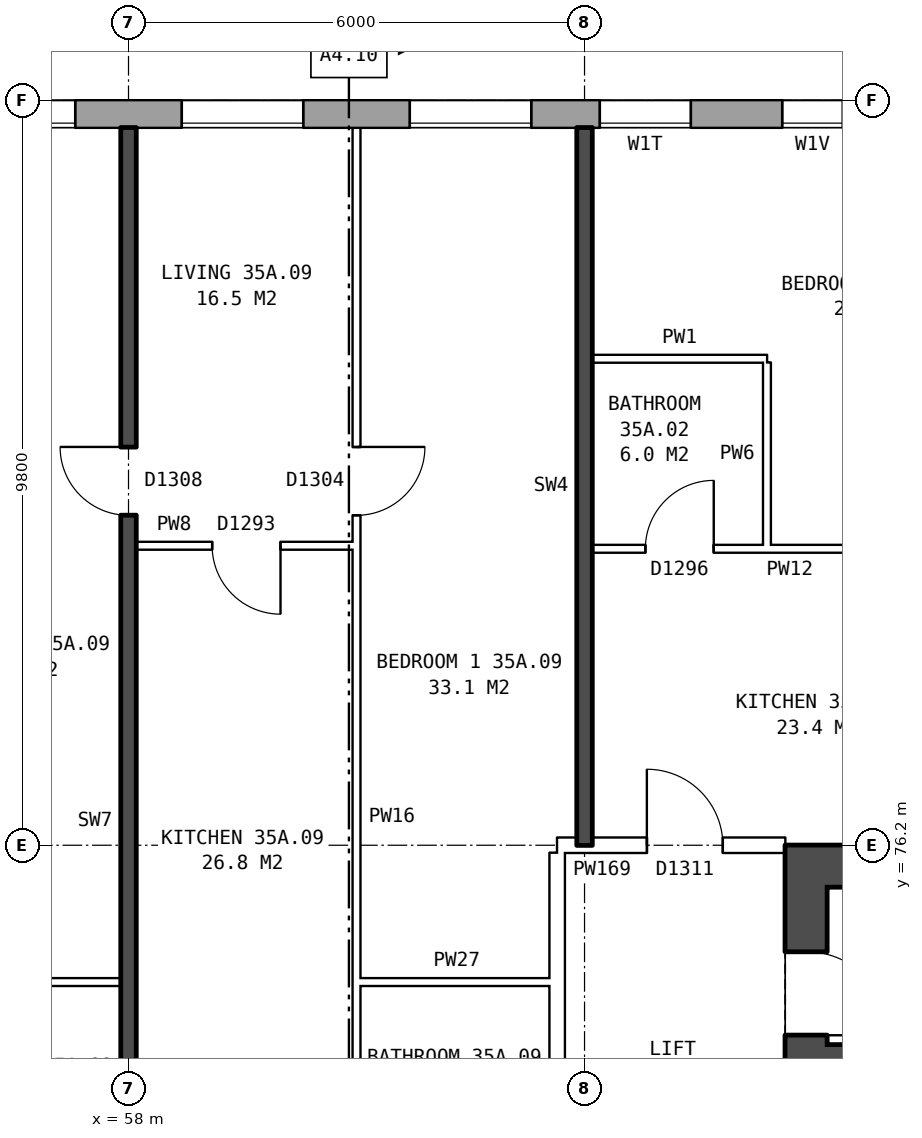
"""IFC4 building model, lengths in metres.
Left out: names, types, materials, properties, quantities, classifications, styles, units other than length and angle.
Written with IfcOpenShell. Run it as: python <this file> out.ifc"""

import sys

from ifc_helpers import new_model, si_unit, direction, frame, frame_2d, origin, place, context, subcontext, project, spatial, rectangle, extrude, element, fill, save


model = new_model("IFC4")
c1 = context("Model", 3, precision=1e-05, world=origin(), true_north=direction((0.0, 1.0)))
c2 = subcontext(c1, "Body", "Model", "MODEL_VIEW")
j1 = project(units=[si_unit("LENGTHUNIT", "METRE"), si_unit("PLANEANGLEUNIT", "RADIAN")], contexts=[c1])
p1 = place(None, origin())
s1 = spatial("IfcSite", under=j1, at=p1, CompositionType="ELEMENT")
p2 = place(p1, origin())
s2 = spatial("IfcBuilding", under=s1, at=p2, CompositionType="ELEMENT")
p3 = place(p2, frame((0.0, 0.0, 126.8)))
s3 = spatial("IfcBuildingStorey", under=s2, at=p3, CompositionType="ELEMENT", Elevation=126.8)
p4 = place(p3, frame((72.925, 85.82, 0.0), z_axis=(0.0, 0.0, 1.0), x_axis=(-1.0, 0.0, 0.0)))
e1 = element("IfcWall", 1, at=p4, inside=s3, PredefinedType="STANDARD", context=c2, shape_type="SweptSolid", body=[
    extrude(rectangle(XDim=43.101, YDim=0.36, at=frame_2d((21.55, 0.0))), origin(), (0.0, 0.0, 1.0), 2.85),
])
p5 = place(p4, frame((0.625, 0.0, 0.8)))
e2 = element("IfcOpeningElement", 2, at=p5, cuts=e1, PredefinedType="OPENING", context=c2, shape_type="SweptSolid", body=[
    extrude(rectangle(XDim=1.6, YDim=1.8, at=frame_2d((0.8, 0.9))), frame((0.0, 0.19, 0.0), z_axis=(0.0, -1.0, 0.0), x_axis=(1.0, 0.0, 0.0)), (0.0, 0.0, 1.0), 0.38),
])
p6 = place(p4, frame((3.625, 0.0, 0.8)))
e3 = element("IfcOpeningElement", 3, at=p6, cuts=e1, PredefinedType="OPENING", context=c2, shape_type="SweptSolid", body=[
    extrude(rectangle(XDim=1.6, YDim=1.8, at=frame_2d((0.8, 0.9))), frame((0.0, 0.19, 0.0), z_axis=(0.0, -1.0, 0.0), x_axis=(1.0, 0.0, 0.0)), (0.0, 0.0, 1.0), 0.38),
])
p7 = place(p4, frame((5.525, 0.0, 1.7)))
e4 = element("IfcOpeningElement", 4, at=p7, cuts=e1, PredefinedType="OPENING", context=c2, shape_type="SweptSolid", body=[
    extrude(rectangle(XDim=0.8, YDim=0.9, at=frame_2d((0.4, 0.45))), frame((0.0, 0.19, 0.0), z_axis=(0.0, -1.0, 0.0), x_axis=(1.0, 0.0, 0.0)), (0.0, 0.0, 1.0), 0.38),
])
p8 = place(p4, frame((9.625, 0.0, 0.8)))
e5 = element("IfcOpeningElement", 5, at=p8, cuts=e1, PredefinedType="OPENING", context=c2, shape_type="SweptSolid", body=[
    extrude(rectangle(XDim=1.6, YDim=1.8, at=frame_2d((0.8, 0.9))), frame((0.0, 0.19, 0.0), z_axis=(0.0, -1.0, 0.0), x_axis=(1.0, 0.0, 0.0)), (0.0, 0.0, 1.0), 0.38),
])
p9 = place(p4, frame((12.625, 0.0, 0.8)))
e6 = element("IfcOpeningElement", 6, at=p9, cuts=e1, PredefinedType="OPENING", context=c2, shape_type="SweptSolid", body=[
    extrude(rectangle(XDim=1.6, YDim=1.8, at=frame_2d((0.8, 0.9))), frame((0.0, 0.19, 0.0), z_axis=(0.0, -1.0, 0.0), x_axis=(1.0, 0.0, 0.0)), (0.0, 0.0, 1.0), 0.38),
])
p10 = place(p4, frame((15.625, 0.0, 0.8)))
e7 = element("IfcOpeningElement", 7, at=p10, cuts=e1, PredefinedType="OPENING", context=c2, shape_type="SweptSolid", body=[
    extrude(rectangle(XDim=1.6, YDim=1.8, at=frame_2d((0.8, 0.9))), frame((0.0, 0.19, 0.0), z_axis=(0.0, -1.0, 0.0), x_axis=(1.0, 0.0, 0.0)), (0.0, 0.0, 1.0), 0.38),
])
p11 = place(p4, frame((18.625, 0.0, 0.8)))
e8 = element("IfcOpeningElement", 8, at=p11, cuts=e1, PredefinedType="OPENING", context=c2, shape_type="SweptSolid", body=[
    extrude(rectangle(XDim=1.6, YDim=1.8, at=frame_2d((0.8, 0.9))), frame((0.0, 0.19, 0.0), z_axis=(0.0, -1.0, 0.0), x_axis=(1.0, 0.0, 0.0)), (0.0, 0.0, 1.0), 0.38),
])
p12 = place(p4, frame((21.625, 0.0, 0.8)))
e9 = element("IfcOpeningElement", 9, at=p12, cuts=e1, PredefinedType="OPENING", context=c2, shape_type="SweptSolid", body=[
    extrude(rectangle(XDim=1.6, YDim=1.8, at=frame_2d((0.8, 0.9))), frame((0.0, 0.19, 0.0), z_axis=(0.0, -1.0, 0.0), x_axis=(1.0, 0.0, 0.0)), (0.0, 0.0, 1.0), 0.38),
])
p13 = place(p4, frame((24.625, 0.0, 0.8)))
e10 = element("IfcOpeningElement", 10, at=p13, cuts=e1, PredefinedType="OPENING", context=c2, shape_type="SweptSolid", body=[
    extrude(rectangle(XDim=1.6, YDim=1.8, at=frame_2d((0.8, 0.9))), frame((0.0, 0.19, 0.0), z_axis=(0.0, -1.0, 0.0), x_axis=(1.0, 0.0, 0.0)), (0.0, 0.0, 1.0), 0.38),
])
p14 = place(p4, frame((27.625, 0.0, 0.8)))
e11 = element("IfcOpeningElement", 11, at=p14, cuts=e1, PredefinedType="OPENING", context=c2, shape_type="SweptSolid", body=[
    extrude(rectangle(XDim=1.6, YDim=1.8, at=frame_2d((0.8, 0.9))), frame((0.0, 0.19, 0.0), z_axis=(0.0, -1.0, 0.0), x_axis=(1.0, 0.0, 0.0)), (0.0, 0.0, 1.0), 0.38),
])
p15 = place(p4, frame((30.625, 0.0, 0.8)))
e12 = element("IfcOpeningElement", 12, at=p15, cuts=e1, PredefinedType="OPENING", context=c2, shape_type="SweptSolid", body=[
    extrude(rectangle(XDim=1.6, YDim=1.8, at=frame_2d((0.8, 0.9))), frame((0.0, 0.19, 0.0), z_axis=(0.0, -1.0, 0.0), x_axis=(1.0, 0.0, 0.0)), (0.0, 0.0, 1.0), 0.38),
])
p16 = place(p4, frame((33.125, 0.0, 0.8)))
e13 = element("IfcOpeningElement", 13, at=p16, cuts=e1, PredefinedType="OPENING", context=c2, shape_type="SweptSolid", body=[
    extrude(rectangle(XDim=1.4, YDim=1.8, at=frame_2d((0.7, 0.9))), frame((0.0, 0.19, 0.0), z_axis=(0.0, -1.0, 0.0), x_axis=(1.0, 0.0, 0.0)), (0.0, 0.0, 1.0), 0.38),
])
p17 = place(p4, frame((34.825, 0.0, 0.8)))
e14 = element("IfcOpeningElement", 14, at=p17, cuts=e1, PredefinedType="OPENING", context=c2, shape_type="SweptSolid", body=[
    extrude(rectangle(XDim=0.6, YDim=0.9, at=frame_2d((0.3, 0.45))), frame((0.0, 0.19, 0.0), z_axis=(0.0, -1.0, 0.0), x_axis=(1.0, 0.0, 0.0)), (0.0, 0.0, 1.0), 0.38),
])
p18 = place(p4, frame((39.625, 0.0, 0.8)))
e15 = element("IfcOpeningElement", 15, at=p18, cuts=e1, PredefinedType="OPENING", context=c2, shape_type="SweptSolid", body=[
    extrude(rectangle(XDim=1.6, YDim=1.8, at=frame_2d((0.8, 0.9))), frame((0.0, 0.19, 0.0), z_axis=(0.0, -1.0, 0.0), x_axis=(1.0, 0.0, 0.0)), (0.0, 0.0, 1.0), 0.38),
])
p19 = place(p4, frame((7.525, 0.0, 0.8)))
e16 = element("IfcOpeningElement", 16, at=p19, cuts=e1, PredefinedType="OPENING", context=c2, shape_type="SweptSolid", body=[
    extrude(rectangle(XDim=1.2, YDim=0.9, at=frame_2d((0.6, 0.45))), frame((0.0, 0.19, 0.0), z_axis=(0.0, -1.0, 0.0), x_axis=(1.0, 0.0, 0.0)), (0.0, 0.0, 1.0), 0.38),
])
p20 = place(p4, frame((36.725, 0.0, 1.7)))
e17 = element("IfcOpeningElement", 17, at=p20, cuts=e1, PredefinedType="OPENING", context=c2, shape_type="SweptSolid", body=[
    extrude(rectangle(XDim=0.6, YDim=0.9, at=frame_2d((0.3, 0.45))), frame((0.0, 0.19, 0.0), z_axis=(0.0, -1.0, 0.0), x_axis=(1.0, 0.0, 0.0)), (0.0, 0.0, 1.0), 0.38),
])
p21 = place(p4, frame((37.725, 0.0, 0.8)))
e18 = element("IfcOpeningElement", 18, at=p21, cuts=e1, PredefinedType="OPENING", context=c2, shape_type="SweptSolid", body=[
    extrude(rectangle(XDim=1.0, YDim=1.8, at=frame_2d((0.5, 0.9))), frame((0.0, 0.19, 0.0), z_axis=(0.0, -1.0, 0.0), x_axis=(1.0, 0.0, 0.0)), (0.0, 0.0, 1.0), 0.38),
])
p22 = place(p3, frame((66.915, 63.8, 0.0), z_axis=(0.0, 0.0, 1.0), x_axis=(0.0, 1.0, 0.0)))
e19 = element("IfcWall", 19, at=p22, inside=s3, PredefinedType="SHEAR", context=c2, shape_type="SweptSolid", body=[
    extrude(rectangle(XDim=12.4, YDim=0.55, at=frame_2d((6.2, 0.0))), origin(), (0.0, 0.0, 1.0), 2.85),
])
p23 = place(p22, frame((1.325, 0.0, 0.0)))
e20 = element("IfcOpeningElement", 20, at=p23, cuts=e19, PredefinedType="OPENING", context=c2, shape_type="SweptSolid", body=[
    extrude(rectangle(XDim=1.1, YDim=2.1, at=frame_2d((0.55, 1.05))), frame((0.0, 0.285, 0.0), z_axis=(0.0, -1.0, 0.0), x_axis=(1.0, 0.0, 0.0)), (0.0, 0.0, 1.0), 0.57),
])
p24 = place(p22, frame((3.6, 0.0, 0.0)))
e21 = element("IfcOpeningElement", 21, at=p24, cuts=e19, PredefinedType="OPENING", context=c2, shape_type="SweptSolid", body=[
    extrude(rectangle(XDim=1.1, YDim=2.1, at=frame_2d((0.55, 1.05))), frame((0.0, 0.285, 0.0), z_axis=(0.0, -1.0, 0.0), x_axis=(1.0, 0.0, 0.0)), (0.0, 0.0, 1.0), 0.57),
])
p25 = place(p22, frame((5.8, 0.0, 0.0)))
e22 = element("IfcOpeningElement", 22, at=p25, cuts=e19, PredefinedType="OPENING", context=c2, shape_type="SweptSolid", body=[
    extrude(rectangle(XDim=1.1, YDim=2.1, at=frame_2d((0.55, 1.05))), frame((0.0, 0.285, 0.0), z_axis=(0.0, -1.0, 0.0), x_axis=(1.0, 0.0, 0.0)), (0.0, 0.0, 1.0), 0.57),
])
p26 = place(p22, frame((8.0, 0.0, 0.0)))
e23 = element("IfcOpeningElement", 23, at=p26, cuts=e19, PredefinedType="OPENING", context=c2, shape_type="SweptSolid", body=[
    extrude(rectangle(XDim=1.1, YDim=2.1, at=frame_2d((0.55, 1.05))), frame((0.0, 0.285, 0.0), z_axis=(0.0, -1.0, 0.0), x_axis=(1.0, 0.0, 0.0)), (0.0, 0.0, 1.0), 0.57),
])
p27 = place(p22, frame((9.9, 0.0, 0.0)))
e24 = element("IfcOpeningElement", 24, at=p27, cuts=e19, PredefinedType="OPENING", context=c2, shape_type="SweptSolid", body=[
    extrude(rectangle(XDim=1.1, YDim=2.1, at=frame_2d((0.55, 1.05))), frame((0.0, 0.285, 0.0), z_axis=(0.0, -1.0, 0.0), x_axis=(1.0, 0.0, 0.0)), (0.0, 0.0, 1.0), 0.57),
])
p28 = place(p3, frame((67.19, 75.925, 0.0), z_axis=(0.0, 0.0, 1.0), x_axis=(1.0, 0.0, 0.0)))
e25 = element("IfcWall", 25, at=p28, inside=s3, PredefinedType="SHEAR", context=c2, shape_type="SweptSolid", body=[
    extrude(rectangle(XDim=7.9, YDim=0.55, at=frame_2d((3.95, 0.0))), origin(), (0.0, 0.0, 1.0), 2.85),
])
p29 = place(p3, frame((67.19, 73.45, 0.0), z_axis=(0.0, 0.0, 1.0), x_axis=(1.0, 0.0, 0.0)))
e26 = element("IfcWall", 26, at=p29, inside=s3, PredefinedType="SHEAR", context=c2, shape_type="SweptSolid", body=[
    extrude(rectangle(XDim=2.375, YDim=0.25, at=frame_2d((1.188, 0.0))), origin(), (0.0, 0.0, 1.0), 2.85),
])
p30 = place(p3, frame((63.64, 63.9, 0.0), z_axis=(0.0, 0.0, 1.0), x_axis=(0.0, 1.0, 0.0)))
e27 = element("IfcWall", 27, at=p30, inside=s3, PredefinedType="PARTITIONING", context=c2, shape_type="SweptSolid", body=[
    extrude(rectangle(XDim=12.2, YDim=0.2, at=frame_2d((6.1, 0.0))), origin(), (0.0, 0.0, 1.0), 2.85),
])
p31 = place(p30, frame((5.1, 0.0, 0.0)))
e28 = element("IfcOpeningElement", 28, at=p31, cuts=e27, PredefinedType="OPENING", context=c2, shape_type="SweptSolid", body=[
    extrude(rectangle(XDim=2.0, YDim=2.1, at=frame_2d((1.0, 1.05))), frame((0.0, 0.11, 0.0), z_axis=(0.0, -1.0, 0.0), x_axis=(1.0, 0.0, 0.0)), (0.0, 0.0, 1.0), 0.22),
])
p32 = place(p3, frame((55.1, 74.4, 0.0), z_axis=(0.0, 0.0, 1.0), x_axis=(1.0, 0.0, 0.0)))
e29 = element("IfcWall", 29, at=p32, inside=s3, PredefinedType="PARTITIONING", context=c2, shape_type="SweptSolid", body=[
    extrude(rectangle(XDim=2.8, YDim=0.1, at=frame_2d((1.4, 0.0))), origin(), (0.0, 0.0, 1.0), 2.85),
])
p33 = place(p3, frame((61.0, 74.4, 0.0), z_axis=(0.0, 0.0, 1.0), x_axis=(1.0, 0.0, 0.0)))
e30 = element("IfcWall", 30, at=p33, inside=s3, PredefinedType="PARTITIONING", context=c2, shape_type="SweptSolid", body=[
    extrude(rectangle(XDim=2.64, YDim=0.1, at=frame_2d((1.32, 0.0))), origin(), (0.0, 0.0, 1.0), 2.85),
])
p34 = place(p3, frame((63.64, 76.2, 0.0), z_axis=(0.0, 0.0, 1.0), x_axis=(1.0, 0.0, 0.0)))
e31 = element("IfcWall", 31, at=p34, inside=s3, PredefinedType="PARTITIONING", context=c2, shape_type="SweptSolid", body=[
    extrude(rectangle(XDim=3.0, YDim=0.2, at=frame_2d((1.5, 0.0))), origin(), (0.0, 0.0, 1.0), 2.85),
])
p35 = place(p34, frame((1.18, 0.0, 0.0)))
e32 = element("IfcOpeningElement", 32, at=p35, cuts=e31, PredefinedType="OPENING", context=c2, shape_type="SweptSolid", body=[
    extrude(rectangle(XDim=1.0, YDim=2.1, at=frame_2d((0.5, 1.05))), frame((0.0, 0.11, 0.0), z_axis=(0.0, -1.0, 0.0), x_axis=(1.0, 0.0, 0.0)), (0.0, 0.0, 1.0), 0.22),
])
p36 = place(p3, frame((64.1, 80.1, 0.0), z_axis=(0.0, 0.0, 1.0), x_axis=(1.0, 0.0, 0.0)))
e33 = element("IfcWall", 33, at=p36, inside=s3, PredefinedType="PARTITIONING", context=c2, shape_type="SweptSolid", body=[
    extrude(rectangle(XDim=5.8, YDim=0.1, at=frame_2d((2.9, 0.0))), origin(), (0.0, 0.0, 1.0), 2.85),
])
p37 = place(p36, frame((3.6, 0.0, 0.0)))
e34 = element("IfcOpeningElement", 34, at=p37, cuts=e33, PredefinedType="OPENING", context=c2, shape_type="SweptSolid", body=[
    extrude(rectangle(XDim=0.9, YDim=2.1, at=frame_2d((0.45, 1.05))), frame((0.0, 0.06, 0.0), z_axis=(0.0, -1.0, 0.0), x_axis=(1.0, 0.0, 0.0)), (0.0, 0.0, 1.0), 0.12),
])
p38 = place(p36, frame((0.7, 0.0, 0.0)))
e35 = element("IfcOpeningElement", 35, at=p38, cuts=e33, PredefinedType="OPENING", context=c2, shape_type="SweptSolid", body=[
    extrude(rectangle(XDim=0.9, YDim=2.1, at=frame_2d((0.45, 1.05))), frame((0.0, 0.06, 0.0), z_axis=(0.0, -1.0, 0.0), x_axis=(1.0, 0.0, 0.0)), (0.0, 0.0, 1.0), 0.12),
])
p39 = place(p3, frame((58.1, 80.14, 0.0), z_axis=(0.0, 0.0, 1.0), x_axis=(1.0, 0.0, 0.0)))
e36 = element("IfcWall", 36, at=p39, inside=s3, PredefinedType="PARTITIONING", context=c2, shape_type="SweptSolid", body=[
    extrude(rectangle(XDim=2.9, YDim=0.1, at=frame_2d((1.45, 0.0))), origin(), (0.0, 0.0, 1.0), 2.85),
])
p40 = place(p39, frame((1.0, 0.0, 0.0)))
e37 = element("IfcOpeningElement", 37, at=p40, cuts=e36, PredefinedType="OPENING", context=c2, shape_type="SweptSolid", body=[
    extrude(rectangle(XDim=0.9, YDim=2.1, at=frame_2d((0.45, 1.05))), frame((0.0, 0.06, 0.0), z_axis=(0.0, -1.0, 0.0), x_axis=(1.0, 0.0, 0.0)), (0.0, 0.0, 1.0), 0.12),
])
p41 = place(p3, frame((64.1, 82.6, 0.0), z_axis=(0.0, 0.0, 1.0), x_axis=(1.0, 0.0, 0.0)))
e38 = element("IfcWall", 38, at=p41, inside=s3, PredefinedType="PARTITIONING", context=c2, shape_type="SweptSolid", body=[
    extrude(rectangle(XDim=2.3, YDim=0.1, at=frame_2d((1.15, 0.0))), origin(), (0.0, 0.0, 1.0), 2.85),
])
p42 = place(p3, frame((58.0, 71.2, 0.0), z_axis=(0.0, 0.0, 1.0), x_axis=(0.0, 1.0, 0.0)))
e39 = element("IfcWall", 39, at=p42, inside=s3, PredefinedType="SOLIDWALL", context=c2, shape_type="SweptSolid", body=[
    extrude(rectangle(XDim=14.44, YDim=0.2, at=frame_2d((7.22, 0.0))), origin(), (0.0, 0.0, 1.0), 2.85),
])
p43 = place(p42, frame((9.34, 0.0, 0.0)))
e40 = element("IfcOpeningElement", 40, at=p43, cuts=e39, PredefinedType="OPENING", context=c2, shape_type="SweptSolid", body=[
    extrude(rectangle(XDim=0.9, YDim=2.1, at=frame_2d((0.45, 1.05))), frame((0.0, 0.11, 0.0), z_axis=(0.0, -1.0, 0.0), x_axis=(1.0, 0.0, 0.0)), (0.0, 0.0, 1.0), 0.22),
])
p44 = place(p42, frame((0.4, 0.0, 0.0)))
e41 = element("IfcOpeningElement", 41, at=p44, cuts=e39, PredefinedType="OPENING", context=c2, shape_type="SweptSolid", body=[
    extrude(rectangle(XDim=0.9, YDim=2.1, at=frame_2d((0.45, 1.05))), frame((0.0, 0.11, 0.0), z_axis=(0.0, -1.0, 0.0), x_axis=(1.0, 0.0, 0.0)), (0.0, 0.0, 1.0), 0.22),
])
p45 = place(p3, frame((61.0, 71.3, 0.0), z_axis=(0.0, 0.0, 1.0), x_axis=(0.0, 1.0, 0.0)))
e42 = element("IfcWall", 42, at=p45, inside=s3, PredefinedType="PARTITIONING", context=c2, shape_type="SweptSolid", body=[
    extrude(rectangle(XDim=14.34, YDim=0.1, at=frame_2d((7.17, 0.0))), origin(), (0.0, 0.0, 1.0), 2.85),
])
p46 = place(p45, frame((9.24, 0.0, 0.0)))
e43 = element("IfcOpeningElement", 43, at=p46, cuts=e42, PredefinedType="OPENING", context=c2, shape_type="SweptSolid", body=[
    extrude(rectangle(XDim=0.9, YDim=2.1, at=frame_2d((0.45, 1.05))), frame((0.0, 0.06, 0.0), z_axis=(0.0, -1.0, 0.0), x_axis=(1.0, 0.0, 0.0)), (0.0, 0.0, 1.0), 0.12),
])
p47 = place(p45, frame((0.4, 0.0, 0.0)))
e44 = element("IfcOpeningElement", 44, at=p47, cuts=e42, PredefinedType="OPENING", context=c2, shape_type="SweptSolid", body=[
    extrude(rectangle(XDim=0.9, YDim=2.1, at=frame_2d((0.45, 1.05))), frame((0.0, 0.06, 0.0), z_axis=(0.0, -1.0, 0.0), x_axis=(1.0, 0.0, 0.0)), (0.0, 0.0, 1.0), 0.12),
])
p48 = place(p3, frame((64.0, 76.2, 0.0), z_axis=(0.0, 0.0, 1.0), x_axis=(0.0, 1.0, 0.0)))
e45 = element("IfcWall", 45, at=p48, inside=s3, PredefinedType="SOLIDWALL", context=c2, shape_type="SweptSolid", body=[
    extrude(rectangle(XDim=9.44, YDim=0.2, at=frame_2d((4.72, 0.0))), origin(), (0.0, 0.0, 1.0), 2.85),
])
p49 = place(p3, frame((66.4, 80.15, 0.0), z_axis=(0.0, 0.0, 1.0), x_axis=(0.0, 1.0, 0.0)))
e46 = element("IfcWall", 46, at=p49, inside=s3, PredefinedType="PARTITIONING", context=c2, shape_type="SweptSolid", body=[
    extrude(rectangle(XDim=2.4, YDim=0.1, at=frame_2d((1.2, 0.0))), origin(), (0.0, 0.0, 1.0), 2.85),
])
p50 = place(p7, origin())
e47 = element("IfcWindow", 47, at=p50, inside=s3, PartitioningType="SINGLE_PANEL", PredefinedType="WINDOW", context=c2, shape_type="SweptSolid", body=[
    extrude(rectangle(XDim=0.8, YDim=0.9, at=frame_2d((0.4, 0.45))), frame((0.0, 0.15, 0.0), z_axis=(0.0, -1.0, 0.0), x_axis=(1.0, 0.0, 0.0)), (0.0, 0.0, 1.0), 0.06),
])
fill(e4, e47)
p51 = place(p8, origin())
e48 = element("IfcWindow", 48, at=p51, inside=s3, PartitioningType="SINGLE_PANEL", PredefinedType="WINDOW", context=c2, shape_type="SweptSolid", body=[
    extrude(rectangle(XDim=1.6, YDim=1.8, at=frame_2d((0.8, 0.9))), frame((0.0, 0.15, 0.0), z_axis=(0.0, -1.0, 0.0), x_axis=(1.0, 0.0, 0.0)), (0.0, 0.0, 1.0), 0.06),
])
fill(e5, e48)
p52 = place(p9, origin())
e49 = element("IfcWindow", 49, at=p52, inside=s3, PartitioningType="SINGLE_PANEL", PredefinedType="WINDOW", context=c2, shape_type="SweptSolid", body=[
    extrude(rectangle(XDim=1.6, YDim=1.8, at=frame_2d((0.8, 0.9))), frame((0.0, 0.15, 0.0), z_axis=(0.0, -1.0, 0.0), x_axis=(1.0, 0.0, 0.0)), (0.0, 0.0, 1.0), 0.06),
])
fill(e6, e49)
p53 = place(p10, origin())
e50 = element("IfcWindow", 50, at=p53, inside=s3, PartitioningType="SINGLE_PANEL", PredefinedType="WINDOW", context=c2, shape_type="SweptSolid", body=[
    extrude(rectangle(XDim=1.6, YDim=1.8, at=frame_2d((0.8, 0.9))), frame((0.0, 0.15, 0.0), z_axis=(0.0, -1.0, 0.0), x_axis=(1.0, 0.0, 0.0)), (0.0, 0.0, 1.0), 0.06),
])
fill(e7, e50)
p54 = place(p27, frame((1.1, 0.0, 0.0), z_axis=(0.0, 0.0, 1.0), x_axis=(-1.0, 0.0, 0.0)))
e51 = element("IfcDoor", 51, at=p54, inside=s3, OperationType="SINGLE_SWING_RIGHT", PredefinedType="DOOR", context=c2, shape_type="SweptSolid", body=[
    extrude(rectangle(XDim=1.1, YDim=2.1, at=frame_2d((0.55, 1.05))), frame((0.0, 0.26, 0.0), z_axis=(0.0, -1.0, 0.0), x_axis=(1.0, 0.0, 0.0)), (0.0, 0.0, 1.0), 0.05),
])
fill(e24, e51)
p55 = place(p35, origin())
e52 = element("IfcDoor", 52, at=p55, inside=s3, OperationType="SINGLE_SWING_LEFT", PredefinedType="DOOR", context=c2, shape_type="SweptSolid", body=[
    extrude(rectangle(XDim=1.0, YDim=2.1, at=frame_2d((0.5, 1.05))), frame((0.0, 0.025, 0.0), z_axis=(0.0, -1.0, 0.0), x_axis=(1.0, 0.0, 0.0)), (0.0, 0.0, 1.0), 0.05),
])
fill(e32, e52)
p56 = place(p38, origin())
e53 = element("IfcDoor", 53, at=p56, inside=s3, OperationType="SINGLE_SWING_RIGHT", PredefinedType="DOOR", context=c2, shape_type="SweptSolid", body=[
    extrude(rectangle(XDim=0.9, YDim=2.1, at=frame_2d((0.45, 1.05))), frame((0.0, 0.025, 0.0), z_axis=(0.0, -1.0, 0.0), x_axis=(1.0, 0.0, 0.0)), (0.0, 0.0, 1.0), 0.05),
])
fill(e35, e53)
p57 = place(p46, frame((0.9, 0.0, 0.0), z_axis=(0.0, 0.0, 1.0), x_axis=(-1.0, 0.0, 0.0)))
e54 = element("IfcDoor", 54, at=p57, inside=s3, OperationType="SINGLE_SWING_LEFT", PredefinedType="DOOR", context=c2, shape_type="SweptSolid", body=[
    extrude(rectangle(XDim=0.9, YDim=2.1, at=frame_2d((0.45, 1.05))), frame((0.0, 0.025, 0.0), z_axis=(0.0, -1.0, 0.0), x_axis=(1.0, 0.0, 0.0)), (0.0, 0.0, 1.0), 0.05),
])
fill(e43, e54)
p58 = place(p43, origin())
e55 = element("IfcDoor", 55, at=p58, inside=s3, OperationType="SINGLE_SWING_RIGHT", PredefinedType="DOOR", context=c2, shape_type="SweptSolid", body=[
    extrude(rectangle(XDim=0.9, YDim=2.1, at=frame_2d((0.45, 1.05))), frame((0.0, 0.025, 0.0), z_axis=(0.0, -1.0, 0.0), x_axis=(1.0, 0.0, 0.0)), (0.0, 0.0, 1.0), 0.05),
])
fill(e40, e55)
p59 = place(p40, frame((0.9, 0.0, 0.0), z_axis=(0.0, 0.0, 1.0), x_axis=(-1.0, 0.0, 0.0)))
e56 = element("IfcDoor", 56, at=p59, inside=s3, OperationType="SINGLE_SWING_LEFT", PredefinedType="DOOR", context=c2, shape_type="SweptSolid", body=[
    extrude(rectangle(XDim=0.9, YDim=2.1, at=frame_2d((0.45, 1.05))), frame((0.0, 0.025, 0.0), z_axis=(0.0, -1.0, 0.0), x_axis=(1.0, 0.0, 0.0)), (0.0, 0.0, 1.0), 0.05),
])
fill(e37, e56)
p60 = place(p19, origin())
e57 = element("IfcWindow", 57, at=p60, inside=s3, PartitioningType="SINGLE_PANEL", PredefinedType="WINDOW", context=c2, shape_type="SweptSolid", body=[
    extrude(rectangle(XDim=1.2, YDim=0.9, at=frame_2d((0.6, 0.45))), frame((0.0, 0.15, 0.0), z_axis=(0.0, -1.0, 0.0), x_axis=(1.0, 0.0, 0.0)), (0.0, 0.0, 1.0), 0.06),
])
fill(e16, e57)
save(model, sys.argv[1])
